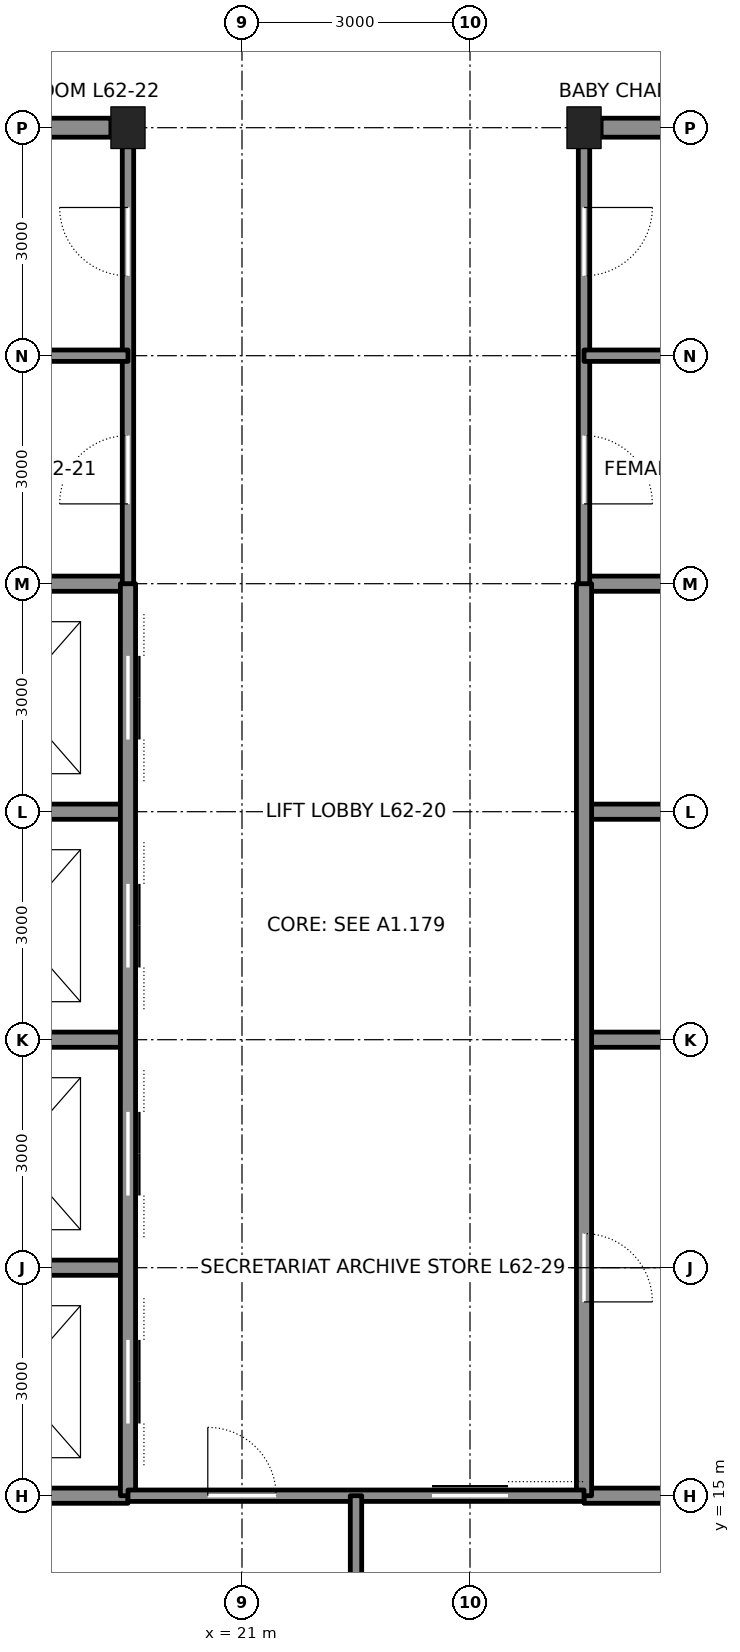
"""IFC4 building model, lengths in metres.
Left out: names, types, materials, properties, quantities, classifications, styles, units other than length and angle.
Written with IfcOpenShell. Run it as: python <this file> out.ifc"""

import sys

from ifc_helpers import new_model, si_unit, direction, frame, frame_2d, origin, origin_2d, place, context, subcontext, project, spatial, rectangle, i_section, extrude, element, fill, save


model = new_model("IFC4")
c1 = context("Model", 3, precision=1e-05, world=origin(), true_north=direction((0.0, 1.0)))
c2 = subcontext(c1, "Body", "Model", "MODEL_VIEW")
j1 = project(units=[si_unit("LENGTHUNIT", "METRE"), si_unit("PLANEANGLEUNIT", "RADIAN")], contexts=[c1])
p1 = place(None, origin())
s1 = spatial("IfcSite", under=j1, at=p1, CompositionType="ELEMENT")
p2 = place(p1, origin())
s2 = spatial("IfcBuilding", under=s1, at=p2, CompositionType="ELEMENT")
p3 = place(p2, frame((0.0, 0.0, 279.0)))
s3 = spatial("IfcBuildingStorey", under=s2, at=p3, CompositionType="ELEMENT", Elevation=279.0)
for number, where, z_axis, x_axis in (
    (1, (19.5, 33.0, 0.0), (0.0, 0.0, 1.0), (1.0, 0.0, 0.0)),
    (2, (25.5, 33.0, 0.0), (0.0, 0.0, 1.0), (1.0, 0.0, 0.0)),
):
    element("IfcColumn", number, at=place(p3, frame(where, z_axis=z_axis, x_axis=x_axis)), inside=s3, PredefinedType="COLUMN", context=c2, shape_type="SweptSolid", body=[
        extrude(i_section(OverallWidth=0.449, OverallDepth=0.549, WebThickness=0.072, FlangeThickness=0.115, at=origin_2d()), origin(), (0.0, 0.0, 1.0), 4.2),
    ])
for number, where, z_axis, x_axis in (
    (3, (12.0, 15.0, 0.0), (0.0, 0.0, 1.0), (1.0, 0.0, 0.0)),
    (4, (25.5, 15.0, 0.0), (0.0, 0.0, 1.0), (1.0, 0.0, 0.0)),
):
    element("IfcWall", number, at=place(p3, frame(where, z_axis=z_axis, x_axis=x_axis)), inside=s3, PredefinedType="SOLIDWALL", context=c2, shape_type="SweptSolid", body=[
        extrude(rectangle(XDim=7.5, YDim=0.2, at=frame_2d((3.75, 0.0))), origin(), (0.0, 0.0, 1.0), 4.04),
    ])
for number, where, z_axis, x_axis in (
    (5, (16.725, 24.0, 0.0), (0.0, 0.0, 1.0), (1.0, 0.0, 0.0)),
    (6, (25.5, 24.0, 0.0), (0.0, 0.0, 1.0), (1.0, 0.0, 0.0)),
):
    element("IfcWall", number, at=place(p3, frame(where, z_axis=z_axis, x_axis=x_axis)), inside=s3, PredefinedType="SOLIDWALL", context=c2, shape_type="SweptSolid", body=[
        extrude(rectangle(XDim=2.775, YDim=0.2, at=frame_2d((1.388, 0.0))), origin(), (0.0, 0.0, 1.0), 3.09),
    ])
p4 = place(p3, frame((12.0, 27.0, 0.0), z_axis=(0.0, 0.0, 1.0), x_axis=(1.0, 0.0, 0.0)))
e7 = element("IfcWall", 7, at=p4, inside=s3, PredefinedType="SOLIDWALL", context=c2, shape_type="SweptSolid", body=[
    extrude(rectangle(XDim=7.5, YDim=0.2, at=frame_2d((3.75, 0.0))), origin(), (0.0, 0.0, 1.0), 4.04),
])
p5 = place(p4, frame((1.65, 0.0, 0.0)))
e8 = element("IfcOpeningElement", 8, at=p5, cuts=e7, PredefinedType="OPENING", context=c2, shape_type="SweptSolid", body=[
    extrude(rectangle(XDim=1.2, YDim=2.1, at=frame_2d((0.6, 1.05))), frame((0.0, 0.11, 0.0), z_axis=(0.0, -1.0, 0.0), x_axis=(1.0, 0.0, 0.0)), (0.0, 0.0, 1.0), 0.22),
])
p6 = place(p3, frame((25.5, 27.0, 0.0), z_axis=(0.0, 0.0, 1.0), x_axis=(1.0, 0.0, 0.0)))
e9 = element("IfcWall", 9, at=p6, inside=s3, PredefinedType="SOLIDWALL", context=c2, shape_type="SweptSolid", body=[
    extrude(rectangle(XDim=3.0, YDim=0.2, at=frame_2d((1.5, 0.0))), origin(), (0.0, 0.0, 1.0), 4.04),
])
for number, where, z_axis, x_axis in (
    (10, (16.725, 33.0, 0.0), (0.0, 0.0, 1.0), (1.0, 0.0, 0.0)),
    (11, (25.725, 33.0, 0.0), (0.0, 0.0, 1.0), (1.0, 0.0, 0.0)),
):
    element("IfcWall", number, at=place(p3, frame(where, z_axis=z_axis, x_axis=x_axis)), inside=s3, PredefinedType="SOLIDWALL", context=c2, shape_type="SweptSolid", body=[
        extrude(rectangle(XDim=2.55, YDim=0.25, at=frame_2d((1.275, 0.0))), origin(), (0.0, 0.0, 1.0), 3.181),
    ])
p7 = place(p3, frame((16.5, 18.0, 0.0), z_axis=(0.0, 0.0, 1.0), x_axis=(1.0, 0.0, 0.0)))
e12 = element("IfcWall", 12, at=p7, inside=s3, PredefinedType="SOLIDWALL", context=c2, shape_type="SweptSolid", body=[
    extrude(rectangle(XDim=3.0, YDim=0.2, at=frame_2d((1.5, 0.0))), origin(), (0.0, 0.0, 1.0), 4.04),
])
for number, where, z_axis, x_axis in (
    (13, (16.725, 21.0, 0.0), (0.0, 0.0, 1.0), (1.0, 0.0, 0.0)),
    (14, (25.5, 21.0, 0.0), (0.0, 0.0, 1.0), (1.0, 0.0, 0.0)),
):
    element("IfcWall", number, at=place(p3, frame(where, z_axis=z_axis, x_axis=x_axis)), inside=s3, PredefinedType="SOLIDWALL", context=c2, shape_type="SweptSolid", body=[
        extrude(rectangle(XDim=2.775, YDim=0.2, at=frame_2d((1.388, 0.0))), origin(), (0.0, 0.0, 1.0), 3.09),
    ])
p8 = place(p3, frame((19.5, 15.0, 0.0), z_axis=(0.0, 0.0, 1.0), x_axis=(0.0, 1.0, 0.0)))
e15 = element("IfcWall", 15, at=p8, inside=s3, PredefinedType="SOLIDWALL", context=c2, shape_type="SweptSolid", body=[
    extrude(rectangle(XDim=12.0, YDim=0.2, at=frame_2d((6.0, 0.0))), origin(), (0.0, 0.0, 1.0), 3.065),
])
p9 = place(p8, frame((0.95, 0.0, 0.0)))
e16 = element("IfcOpeningElement", 16, at=p9, cuts=e15, PredefinedType="OPENING", context=c2, shape_type="SweptSolid", body=[
    extrude(rectangle(XDim=1.1, YDim=2.1, at=frame_2d((0.55, 1.05))), frame((0.0, 0.11, 0.0), z_axis=(0.0, -1.0, 0.0), x_axis=(1.0, 0.0, 0.0)), (0.0, 0.0, 1.0), 0.22),
])
p10 = place(p8, frame((3.95, 0.0, 0.0)))
e17 = element("IfcOpeningElement", 17, at=p10, cuts=e15, PredefinedType="OPENING", context=c2, shape_type="SweptSolid", body=[
    extrude(rectangle(XDim=1.1, YDim=2.1, at=frame_2d((0.55, 1.05))), frame((0.0, 0.11, 0.0), z_axis=(0.0, -1.0, 0.0), x_axis=(1.0, 0.0, 0.0)), (0.0, 0.0, 1.0), 0.22),
])
p11 = place(p8, frame((6.95, 0.0, 0.0)))
e18 = element("IfcOpeningElement", 18, at=p11, cuts=e15, PredefinedType="OPENING", context=c2, shape_type="SweptSolid", body=[
    extrude(rectangle(XDim=1.1, YDim=2.1, at=frame_2d((0.55, 1.05))), frame((0.0, 0.11, 0.0), z_axis=(0.0, -1.0, 0.0), x_axis=(1.0, 0.0, 0.0)), (0.0, 0.0, 1.0), 0.22),
])
p12 = place(p8, frame((9.95, 0.0, 0.0)))
e19 = element("IfcOpeningElement", 19, at=p12, cuts=e15, PredefinedType="OPENING", context=c2, shape_type="SweptSolid", body=[
    extrude(rectangle(XDim=1.1, YDim=2.1, at=frame_2d((0.55, 1.05))), frame((0.0, 0.11, 0.0), z_axis=(0.0, -1.0, 0.0), x_axis=(1.0, 0.0, 0.0)), (0.0, 0.0, 1.0), 0.22),
])
p13 = place(p3, frame((19.5, 27.0, 0.0), z_axis=(0.0, 0.0, 1.0), x_axis=(0.0, 1.0, 0.0)))
e20 = element("IfcWall", 20, at=p13, inside=s3, PredefinedType="PARTITIONING", context=c2, shape_type="SweptSolid", body=[
    extrude(rectangle(XDim=5.75, YDim=0.15, at=frame_2d((2.875, 0.0))), origin(), (0.0, 0.0, 1.0), 3.065),
])
p14 = place(p13, frame((1.05, 0.0, 0.0)))
e21 = element("IfcOpeningElement", 21, at=p14, cuts=e20, PredefinedType="OPENING", context=c2, shape_type="SweptSolid", body=[
    extrude(rectangle(XDim=0.9, YDim=2.1, at=frame_2d((0.45, 1.05))), frame((0.0, 0.085, 0.0), z_axis=(0.0, -1.0, 0.0), x_axis=(1.0, 0.0, 0.0)), (0.0, 0.0, 1.0), 0.17),
])
p15 = place(p13, frame((4.05, 0.0, 0.0)))
e22 = element("IfcOpeningElement", 22, at=p15, cuts=e20, PredefinedType="OPENING", context=c2, shape_type="SweptSolid", body=[
    extrude(rectangle(XDim=0.9, YDim=2.1, at=frame_2d((0.45, 1.05))), frame((0.0, 0.085, 0.0), z_axis=(0.0, -1.0, 0.0), x_axis=(1.0, 0.0, 0.0)), (0.0, 0.0, 1.0), 0.17),
])
p16 = place(p3, frame((25.5, 15.0, 0.0), z_axis=(0.0, 0.0, 1.0), x_axis=(0.0, 1.0, 0.0)))
e23 = element("IfcWall", 23, at=p16, inside=s3, PredefinedType="SOLIDWALL", context=c2, shape_type="SweptSolid", body=[
    extrude(rectangle(XDim=12.0, YDim=0.2, at=frame_2d((6.0, 0.0))), origin(), (0.0, 0.0, 1.0), 3.065),
])
p17 = place(p16, frame((2.55, 0.0, 0.0)))
e24 = element("IfcOpeningElement", 24, at=p17, cuts=e23, PredefinedType="OPENING", context=c2, shape_type="SweptSolid", body=[
    extrude(rectangle(XDim=0.9, YDim=2.1, at=frame_2d((0.45, 1.05))), frame((0.0, 0.11, 0.0), z_axis=(0.0, -1.0, 0.0), x_axis=(1.0, 0.0, 0.0)), (0.0, 0.0, 1.0), 0.22),
])
p18 = place(p3, frame((25.5, 27.0, 0.0), z_axis=(0.0, 0.0, 1.0), x_axis=(0.0, 1.0, 0.0)))
e25 = element("IfcWall", 25, at=p18, inside=s3, PredefinedType="PARTITIONING", context=c2, shape_type="SweptSolid", body=[
    extrude(rectangle(XDim=5.75, YDim=0.15, at=frame_2d((2.875, 0.0))), origin(), (0.0, 0.0, 1.0), 3.065),
])
p19 = place(p18, frame((1.05, 0.0, 0.0)))
e26 = element("IfcOpeningElement", 26, at=p19, cuts=e25, PredefinedType="OPENING", context=c2, shape_type="SweptSolid", body=[
    extrude(rectangle(XDim=0.9, YDim=2.1, at=frame_2d((0.45, 1.05))), frame((0.0, 0.085, 0.0), z_axis=(0.0, -1.0, 0.0), x_axis=(1.0, 0.0, 0.0)), (0.0, 0.0, 1.0), 0.17),
])
p20 = place(p18, frame((4.05, 0.0, 0.0)))
e27 = element("IfcOpeningElement", 27, at=p20, cuts=e25, PredefinedType="OPENING", context=c2, shape_type="SweptSolid", body=[
    extrude(rectangle(XDim=0.9, YDim=2.1, at=frame_2d((0.45, 1.05))), frame((0.0, 0.085, 0.0), z_axis=(0.0, -1.0, 0.0), x_axis=(1.0, 0.0, 0.0)), (0.0, 0.0, 1.0), 0.17),
])
p21 = place(p3, frame((19.5, 15.0, 0.0), z_axis=(0.0, 0.0, 1.0), x_axis=(1.0, 0.0, 0.0)))
e28 = element("IfcWall", 28, at=p21, inside=s3, PredefinedType="PARTITIONING", context=c2, shape_type="SweptSolid", body=[
    extrude(rectangle(XDim=6.0, YDim=0.15, at=frame_2d((3.0, 0.0))), origin(), (0.0, 0.0, 1.0), 4.04),
])
p22 = place(p21, frame((4.0, 0.0, 0.0)))
e29 = element("IfcOpeningElement", 29, at=p22, cuts=e28, PredefinedType="OPENING", context=c2, shape_type="SweptSolid", body=[
    extrude(rectangle(XDim=1.0, YDim=2.1, at=frame_2d((0.5, 1.05))), frame((0.0, 0.085, 0.0), z_axis=(0.0, -1.0, 0.0), x_axis=(1.0, 0.0, 0.0)), (0.0, 0.0, 1.0), 0.17),
])
p23 = place(p21, frame((1.05, 0.0, 0.0)))
e30 = element("IfcOpeningElement", 30, at=p23, cuts=e28, PredefinedType="OPENING", context=c2, shape_type="SweptSolid", body=[
    extrude(rectangle(XDim=0.9, YDim=2.1, at=frame_2d((0.45, 1.05))), frame((0.0, 0.085, 0.0), z_axis=(0.0, -1.0, 0.0), x_axis=(1.0, 0.0, 0.0)), (0.0, 0.0, 1.0), 0.17),
])
for number, where, z_axis, x_axis in (
    (31, (22.5, 15.0, 0.0), (0.0, 0.0, 1.0), (0.0, -1.0, 0.0)),
    (32, (16.5, 30.0, 0.0), (0.0, 0.0, 1.0), (1.0, 0.0, 0.0)),
    (33, (25.5, 30.0, 0.0), (0.0, 0.0, 1.0), (1.0, 0.0, 0.0)),
):
    element("IfcWall", number, at=place(p3, frame(where, z_axis=z_axis, x_axis=x_axis)), inside=s3, PredefinedType="PARTITIONING", context=c2, shape_type="SweptSolid", body=[
        extrude(rectangle(XDim=3.0, YDim=0.15, at=frame_2d((1.5, 0.0))), origin(), (0.0, 0.0, 1.0), 4.04),
    ])
p24 = place(p14, origin())
e34 = element("IfcDoor", 34, at=p24, inside=s3, OperationType="SINGLE_SWING_LEFT", PredefinedType="DOOR", context=c2, shape_type="SweptSolid", body=[
    extrude(rectangle(XDim=0.9, YDim=2.1, at=frame_2d((0.45, 1.05))), frame((0.0, 0.025, 0.0), z_axis=(0.0, -1.0, 0.0), x_axis=(1.0, 0.0, 0.0)), (0.0, 0.0, 1.0), 0.05),
])
fill(e21, e34)
p25 = place(p15, origin())
e35 = element("IfcDoor", 35, at=p25, inside=s3, OperationType="SINGLE_SWING_RIGHT", PredefinedType="DOOR", context=c2, shape_type="SweptSolid", body=[
    extrude(rectangle(XDim=0.9, YDim=2.1, at=frame_2d((0.45, 1.05))), frame((0.0, 0.025, 0.0), z_axis=(0.0, -1.0, 0.0), x_axis=(1.0, 0.0, 0.0)), (0.0, 0.0, 1.0), 0.05),
])
fill(e22, e35)
p26 = place(p19, frame((0.9, 0.0, 0.0), z_axis=(0.0, 0.0, 1.0), x_axis=(-1.0, 0.0, 0.0)))
e36 = element("IfcDoor", 36, at=p26, inside=s3, OperationType="SINGLE_SWING_RIGHT", PredefinedType="DOOR", context=c2, shape_type="SweptSolid", body=[
    extrude(rectangle(XDim=0.9, YDim=2.1, at=frame_2d((0.45, 1.05))), frame((0.0, 0.025, 0.0), z_axis=(0.0, -1.0, 0.0), x_axis=(1.0, 0.0, 0.0)), (0.0, 0.0, 1.0), 0.05),
])
fill(e26, e36)
p27 = place(p20, frame((0.9, 0.0, 0.0), z_axis=(0.0, 0.0, 1.0), x_axis=(-1.0, 0.0, 0.0)))
e37 = element("IfcDoor", 37, at=p27, inside=s3, OperationType="SINGLE_SWING_LEFT", PredefinedType="DOOR", context=c2, shape_type="SweptSolid", body=[
    extrude(rectangle(XDim=0.9, YDim=2.1, at=frame_2d((0.45, 1.05))), frame((0.0, 0.025, 0.0), z_axis=(0.0, -1.0, 0.0), x_axis=(1.0, 0.0, 0.0)), (0.0, 0.0, 1.0), 0.05),
])
fill(e27, e37)
p28 = place(p22, origin())
e38 = element("IfcDoor", 38, at=p28, inside=s3, OperationType="SLIDING_TO_LEFT", PredefinedType="DOOR", context=c2, shape_type="SweptSolid", body=[
    extrude(rectangle(XDim=1.0, YDim=2.1, at=frame_2d((0.5, 1.05))), frame((0.0, 0.025, 0.0), z_axis=(0.0, -1.0, 0.0), x_axis=(1.0, 0.0, 0.0)), (0.0, 0.0, 1.0), 0.05),
])
fill(e29, e38)
p29 = place(p17, frame((0.9, 0.0, 0.0), z_axis=(0.0, 0.0, 1.0), x_axis=(-1.0, 0.0, 0.0)))
e39 = element("IfcDoor", 39, at=p29, inside=s3, OperationType="SINGLE_SWING_RIGHT", PredefinedType="DOOR", context=c2, shape_type="SweptSolid", body=[
    extrude(rectangle(XDim=0.9, YDim=2.1, at=frame_2d((0.45, 1.05))), frame((0.0, 0.025, 0.0), z_axis=(0.0, -1.0, 0.0), x_axis=(1.0, 0.0, 0.0)), (0.0, 0.0, 1.0), 0.05),
])
fill(e24, e39)
p30 = place(p23, origin())
e40 = element("IfcDoor", 40, at=p30, inside=s3, OperationType="SINGLE_SWING_LEFT", PredefinedType="DOOR", context=c2, shape_type="SweptSolid", body=[
    extrude(rectangle(XDim=0.9, YDim=2.1, at=frame_2d((0.45, 1.05))), frame((0.0, 0.025, 0.0), z_axis=(0.0, -1.0, 0.0), x_axis=(1.0, 0.0, 0.0)), (0.0, 0.0, 1.0), 0.05),
])
fill(e30, e40)
p31 = place(p9, origin())
e41 = element("IfcDoor", 41, at=p31, inside=s3, OperationType="DOUBLE_DOOR_SLIDING", PredefinedType="DOOR", context=c2, shape_type="SweptSolid", body=[
    extrude(rectangle(XDim=1.1, YDim=2.1, at=frame_2d((0.55, 1.05))), frame((0.0, 0.025, 0.0), z_axis=(0.0, -1.0, 0.0), x_axis=(1.0, 0.0, 0.0)), (0.0, 0.0, 1.0), 0.05),
])
fill(e16, e41)
p32 = place(p10, origin())
e42 = element("IfcDoor", 42, at=p32, inside=s3, OperationType="DOUBLE_DOOR_SLIDING", PredefinedType="DOOR", context=c2, shape_type="SweptSolid", body=[
    extrude(rectangle(XDim=1.1, YDim=2.1, at=frame_2d((0.55, 1.05))), frame((0.0, 0.025, 0.0), z_axis=(0.0, -1.0, 0.0), x_axis=(1.0, 0.0, 0.0)), (0.0, 0.0, 1.0), 0.05),
])
fill(e17, e42)
p33 = place(p11, origin())
e43 = element("IfcDoor", 43, at=p33, inside=s3, OperationType="DOUBLE_DOOR_SLIDING", PredefinedType="DOOR", context=c2, shape_type="SweptSolid", body=[
    extrude(rectangle(XDim=1.1, YDim=2.1, at=frame_2d((0.55, 1.05))), frame((0.0, 0.025, 0.0), z_axis=(0.0, -1.0, 0.0), x_axis=(1.0, 0.0, 0.0)), (0.0, 0.0, 1.0), 0.05),
])
fill(e18, e43)
p34 = place(p12, origin())
e44 = element("IfcDoor", 44, at=p34, inside=s3, OperationType="DOUBLE_DOOR_SLIDING", PredefinedType="DOOR", context=c2, shape_type="SweptSolid", body=[
    extrude(rectangle(XDim=1.1, YDim=2.1, at=frame_2d((0.55, 1.05))), frame((0.0, 0.025, 0.0), z_axis=(0.0, -1.0, 0.0), x_axis=(1.0, 0.0, 0.0)), (0.0, 0.0, 1.0), 0.05),
])
fill(e19, e44)
save(model, sys.argv[1])
